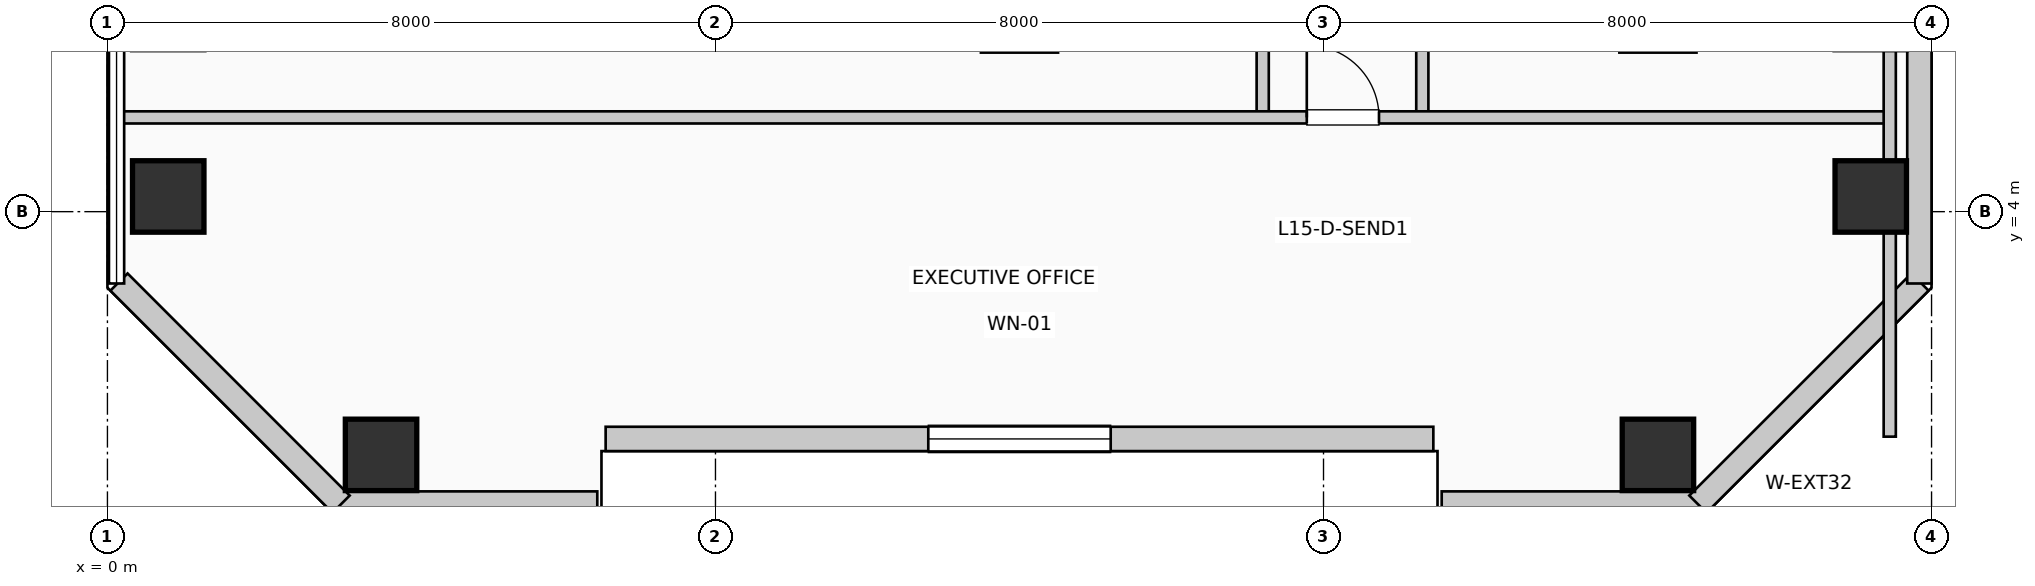
"""IFC4 building model, lengths in metres.
Left out: names, types, materials, properties, quantities, classifications, styles, units other than length and angle.
Written with IfcOpenShell. Run it as: python <this file> out.ifc"""

import sys

from ifc_helpers import new_model, si_unit, direction, frame, frame_2d, origin, origin_2d, place, context, subcontext, project, spatial, rectangle, extrude, element, fill, save


model = new_model("IFC4")
c1 = context("Model", 3, precision=1e-05, world=origin(), true_north=direction((0.0, 1.0)))
c2 = subcontext(c1, "Body", "Model", "MODEL_VIEW")
j1 = project(units=[si_unit("LENGTHUNIT", "METRE"), si_unit("PLANEANGLEUNIT", "RADIAN")], contexts=[c1])
p1 = place(None, origin())
s1 = spatial("IfcSite", under=j1, at=p1, CompositionType="ELEMENT")
p2 = place(p1, origin())
s2 = spatial("IfcBuilding", under=s1, at=p2, CompositionType="ELEMENT")
p3 = place(p2, frame((0.0, 0.0, 66.0)))
s3 = spatial("IfcBuildingStorey", under=s2, at=p3, CompositionType="ELEMENT", Elevation=66.0)
for number, where, z_axis, x_axis in (
    (1, (0.8, 4.2, 0.0), (0.0, 0.0, 1.0), (1.0, 0.0, 0.0)),
    (2, (3.6, 0.8, 0.0), (0.0, 0.0, 1.0), (1.0, 0.0, 0.0)),
    (3, (20.4, 0.8, 0.0), (0.0, 0.0, 1.0), (1.0, 0.0, 0.0)),
    (4, (23.2, 4.2, 0.0), (0.0, 0.0, 1.0), (1.0, 0.0, 0.0)),
):
    element("IfcColumn", number, at=place(p3, frame(where, z_axis=z_axis, x_axis=x_axis)), inside=s3, PredefinedType="COLUMN", context=c2, shape_type="SweptSolid", body=[
        extrude(rectangle(XDim=0.94, YDim=0.94, at=origin_2d()), origin(), (0.0, 0.0, 1.0), 3.96),
    ])
p4 = place(p3, frame((3.055, 0.16, 0.0), z_axis=(0.0, 0.0, 1.0), x_axis=(1.0, 0.0, 0.0)))
e5 = element("IfcWall", 5, at=p4, inside=s3, PredefinedType="SOLIDWALL", context=c2, shape_type="SweptSolid", body=[
    extrude(rectangle(XDim=3.39, YDim=0.32, at=frame_2d((1.695, 0.0))), origin(), (0.0, 0.0, 1.0), 3.71),
])
p5 = place(p3, frame((6.555, 1.01, 0.0), z_axis=(0.0, 0.0, 1.0), x_axis=(1.0, 0.0, 0.0)))
e6 = element("IfcWall", 6, at=p5, inside=s3, PredefinedType="SOLIDWALL", context=c2, shape_type="SweptSolid", body=[
    extrude(rectangle(XDim=10.89, YDim=0.32, at=frame_2d((5.445, 0.0))), origin(), (0.0, 0.0, 1.0), 3.71),
])
p6 = place(p5, frame((4.245, 0.0, 0.85)))
e7 = element("IfcOpeningElement", 7, at=p6, cuts=e6, PredefinedType="OPENING", context=c2, shape_type="SweptSolid", body=[
    extrude(rectangle(XDim=2.4, YDim=2.05, at=frame_2d((1.2, 1.025))), frame((0.0, 0.17, 0.0), z_axis=(0.0, -1.0, 0.0), x_axis=(1.0, 0.0, 0.0)), (0.0, 0.0, 1.0), 0.34),
])
p7 = place(p3, frame((17.555, 0.16, 0.0), z_axis=(0.0, 0.0, 1.0), x_axis=(1.0, 0.0, 0.0)))
e8 = element("IfcWall", 8, at=p7, inside=s3, PredefinedType="SOLIDWALL", context=c2, shape_type="SweptSolid", body=[
    extrude(rectangle(XDim=3.39, YDim=0.32, at=frame_2d((1.695, 0.0))), origin(), (0.0, 0.0, 1.0), 3.71),
])
p8 = place(p3, frame((20.926, 0.152, 0.0), z_axis=(0.0, 0.0, 1.0), x_axis=(0.707106781187, 0.707106781187, 0.0)))
e9 = element("IfcWall", 9, at=p8, inside=s3, PredefinedType="SOLIDWALL", context=c2, shape_type="SweptSolid", body=[
    extrude(rectangle(XDim=4.133, YDim=0.32, at=frame_2d((2.066, 0.0))), origin(), (0.0, 0.0, 1.0), 3.71),
])
p9 = place(p3, frame((23.84, 3.055, 0.0), z_axis=(0.0, 0.0, 1.0), x_axis=(0.0, 1.0, 0.0)))
e10 = element("IfcWall", 10, at=p9, inside=s3, PredefinedType="SOLIDWALL", context=c2, shape_type="SweptSolid", body=[
    extrude(rectangle(XDim=12.89, YDim=0.32, at=frame_2d((6.445, 0.0))), origin(), (0.0, 0.0, 1.0), 3.71),
])
p10 = place(p3, frame((0.152, 3.074, 0.0), z_axis=(0.0, 0.0, 1.0), x_axis=(0.707106781187, -0.707106781187, 0.0)))
e11 = element("IfcWall", 11, at=p10, inside=s3, PredefinedType="SOLIDWALL", context=c2, shape_type="SweptSolid", body=[
    extrude(rectangle(XDim=4.133, YDim=0.32, at=frame_2d((2.066, 0.0))), origin(), (0.0, 0.0, 1.0), 3.71),
])
p11 = place(p3, frame((15.2, 5.24, 0.0), z_axis=(0.0, 0.0, 1.0), x_axis=(0.0, 1.0, 0.0)))
e12 = element("IfcWall", 12, at=p11, inside=s3, PredefinedType="PARTITIONING", context=c2, shape_type="SweptSolid", body=[
    extrude(rectangle(XDim=24.16, YDim=0.16, at=frame_2d((12.08, 0.0))), origin(), (0.0, 0.0, 1.0), 3.71),
])
p12 = place(p11, frame((2.77, 0.0, 0.0), z_axis=(0.0, 0.0, 1.0), x_axis=(-1.0, 0.0, 0.0)))
e13 = element("IfcOpeningElement", 13, at=p12, cuts=e12, PredefinedType="OPENING", context=c2, shape_type="SweptSolid", body=[
    extrude(rectangle(XDim=0.95, YDim=2.15, at=frame_2d((0.475, 1.075))), frame((0.0, 0.09, 0.0), z_axis=(0.0, -1.0, 0.0), x_axis=(1.0, 0.0, 0.0)), (0.0, 0.0, 1.0), 0.18),
])
p13 = place(p11, frame((7.481, 0.0, 0.0), z_axis=(0.0, 0.0, 1.0), x_axis=(-1.0, 0.0, 0.0)))
e14 = element("IfcOpeningElement", 14, at=p13, cuts=e12, PredefinedType="OPENING", context=c2, shape_type="SweptSolid", body=[
    extrude(rectangle(XDim=0.95, YDim=2.15, at=frame_2d((0.475, 1.075))), frame((0.0, 0.09, 0.0), z_axis=(0.0, -1.0, 0.0), x_axis=(1.0, 0.0, 0.0)), (0.0, 0.0, 1.0), 0.18),
])
p14 = place(p11, frame((12.313, 0.0, 0.0), z_axis=(0.0, 0.0, 1.0), x_axis=(-1.0, 0.0, 0.0)))
e15 = element("IfcOpeningElement", 15, at=p14, cuts=e12, PredefinedType="OPENING", context=c2, shape_type="SweptSolid", body=[
    extrude(rectangle(XDim=0.95, YDim=2.15, at=frame_2d((0.475, 1.075))), frame((0.0, 0.09, 0.0), z_axis=(0.0, -1.0, 0.0), x_axis=(1.0, 0.0, 0.0)), (0.0, 0.0, 1.0), 0.18),
])
p15 = place(p11, frame((17.145, 0.0, 0.0), z_axis=(0.0, 0.0, 1.0), x_axis=(-1.0, 0.0, 0.0)))
e16 = element("IfcOpeningElement", 16, at=p15, cuts=e12, PredefinedType="OPENING", context=c2, shape_type="SweptSolid", body=[
    extrude(rectangle(XDim=0.95, YDim=2.15, at=frame_2d((0.475, 1.075))), frame((0.0, 0.09, 0.0), z_axis=(0.0, -1.0, 0.0), x_axis=(1.0, 0.0, 0.0)), (0.0, 0.0, 1.0), 0.18),
])
p16 = place(p11, frame((22.098, 0.0, 0.0), z_axis=(0.0, 0.0, 1.0), x_axis=(-1.0, 0.0, 0.0)))
e17 = element("IfcOpeningElement", 17, at=p16, cuts=e12, PredefinedType="OPENING", context=c2, shape_type="SweptSolid", body=[
    extrude(rectangle(XDim=0.95, YDim=2.15, at=frame_2d((0.475, 1.075))), frame((0.0, 0.09, 0.0), z_axis=(0.0, -1.0, 0.0), x_axis=(1.0, 0.0, 0.0)), (0.0, 0.0, 1.0), 0.18),
])
p17 = place(p3, frame((17.3, 5.24, 0.0), z_axis=(0.0, 0.0, 1.0), x_axis=(0.0, 1.0, 0.0)))
e18 = element("IfcWall", 18, at=p17, inside=s3, PredefinedType="PARTITIONING", context=c2, shape_type="SweptSolid", body=[
    extrude(rectangle(XDim=24.16, YDim=0.16, at=frame_2d((12.08, 0.0))), origin(), (0.0, 0.0, 1.0), 3.71),
])
p18 = place(p17, frame((5.565, 0.0, 0.0)))
e19 = element("IfcOpeningElement", 19, at=p18, cuts=e18, PredefinedType="OPENING", context=c2, shape_type="SweptSolid", body=[
    extrude(rectangle(XDim=0.95, YDim=2.15, at=frame_2d((0.475, 1.075))), frame((0.0, 0.09, 0.0), z_axis=(0.0, -1.0, 0.0), x_axis=(1.0, 0.0, 0.0)), (0.0, 0.0, 1.0), 0.18),
])
p19 = place(p17, frame((17.645, 0.0, 0.0)))
e20 = element("IfcOpeningElement", 20, at=p19, cuts=e18, PredefinedType="OPENING", context=c2, shape_type="SweptSolid", body=[
    extrude(rectangle(XDim=0.95, YDim=2.15, at=frame_2d((0.475, 1.075))), frame((0.0, 0.09, 0.0), z_axis=(0.0, -1.0, 0.0), x_axis=(1.0, 0.0, 0.0)), (0.0, 0.0, 1.0), 0.18),
])
p20 = place(p3, frame((0.19, 5.24, 0.0), z_axis=(0.0, 0.0, 1.0), x_axis=(1.0, 0.0, 0.0)))
e21 = element("IfcWall", 21, at=p20, inside=s3, PredefinedType="PARTITIONING", context=c2, shape_type="SweptSolid", body=[
    extrude(rectangle(XDim=23.26, YDim=0.16, at=frame_2d((11.63, 0.0))), origin(), (0.0, 0.0, 1.0), 3.71),
])
p21 = place(p20, frame((15.59, 0.0, 0.0)))
e22 = element("IfcOpeningElement", 22, at=p21, cuts=e21, PredefinedType="OPENING", context=c2, shape_type="SweptSolid", body=[
    extrude(rectangle(XDim=0.95, YDim=2.15, at=frame_2d((0.475, 1.075))), frame((0.0, 0.09, 0.0), z_axis=(0.0, -1.0, 0.0), x_axis=(1.0, 0.0, 0.0)), (0.0, 0.0, 1.0), 0.18),
])
p22 = place(p3, frame((23.45, 1.04, 0.0), z_axis=(0.0, 0.0, 1.0), x_axis=(0.0, 1.0, 0.0)))
e23 = element("IfcWall", 23, at=p22, inside=s3, PredefinedType="PARTITIONING", context=c2, shape_type="SweptSolid", body=[
    extrude(rectangle(XDim=28.36, YDim=0.16, at=frame_2d((14.18, 0.0))), origin(), (0.0, 0.0, 1.0), 2.995),
])
p23 = place(p6, origin())
e24 = element("IfcWindow", 24, at=p23, inside=s3, PartitioningType="SINGLE_PANEL", PredefinedType="WINDOW", context=c2, shape_type="SweptSolid", body=[
    extrude(rectangle(XDim=2.4, YDim=2.05, at=frame_2d((1.2, 1.025))), frame((0.0, 0.03, 0.0), z_axis=(0.0, -1.0, 0.0), x_axis=(1.0, 0.0, 0.0)), (0.0, 0.0, 1.0), 0.06),
])
fill(e7, e24)
p24 = place(p21, origin())
e25 = element("IfcDoor", 25, at=p24, inside=s3, OperationType="SINGLE_SWING_LEFT", PredefinedType="DOOR", context=c2, shape_type="SweptSolid", body=[
    extrude(rectangle(XDim=0.95, YDim=2.15, at=frame_2d((0.475, 1.075))), frame((0.0, 0.025, 0.0), z_axis=(0.0, -1.0, 0.0), x_axis=(1.0, 0.0, 0.0)), (0.0, 0.0, 1.0), 0.05),
])
fill(e22, e25)
save(model, sys.argv[1])
